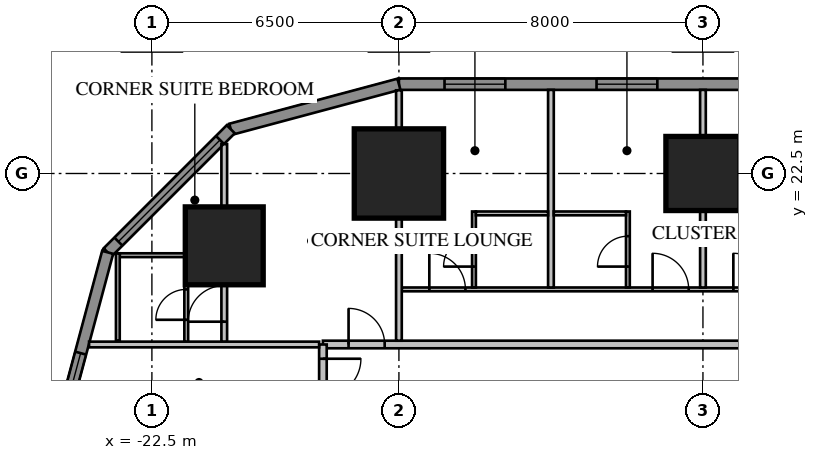
"""IFC4 building model, lengths in metres.
Left out: names, types, materials, properties, quantities, classifications, styles, units other than length and angle.
Written with IfcOpenShell. Run it as: python <this file> out.ifc"""

import sys

from ifc_helpers import new_model, si_unit, direction, frame, frame_2d, origin, origin_2d, place, context, subcontext, project, spatial, rectangle, extrude, element, fill, save


model = new_model("IFC4")
c1 = context("Model", 3, precision=1e-05, world=origin(), true_north=direction((0.0, 1.0)))
c2 = subcontext(c1, "Body", "Model", "MODEL_VIEW")
j1 = project(units=[si_unit("LENGTHUNIT", "METRE"), si_unit("PLANEANGLEUNIT", "RADIAN")], contexts=[c1])
p1 = place(None, origin())
s1 = spatial("IfcSite", under=j1, at=p1, CompositionType="ELEMENT")
p2 = place(p1, origin())
s2 = spatial("IfcBuilding", under=s1, at=p2, CompositionType="ELEMENT")
p3 = place(p2, frame((0.0, 0.0, 39.1)))
s3 = spatial("IfcBuildingStorey", under=s2, at=p3, CompositionType="ELEMENT", Elevation=39.1)
p4 = place(p3, frame((-8.0, 22.5, 0.0), z_axis=(0.0, 0.0, 1.0), x_axis=(1.0, 0.0, 0.0)))
e1 = element("IfcColumn", 1, at=p4, inside=s3, PredefinedType="COLUMN", context=c2, shape_type="SweptSolid", body=[
    extrude(rectangle(XDim=1.95, YDim=1.95, at=origin_2d()), origin(), (0.0, 0.0, 1.0), 3.85),
])
p5 = place(p3, frame((-16.0, 22.5, 0.0), z_axis=(0.0, 0.0, 1.0), x_axis=(1.0, 0.0, 0.0)))
e2 = element("IfcColumn", 2, at=p5, inside=s3, PredefinedType="COLUMN", context=c2, shape_type="SweptSolid", body=[
    extrude(rectangle(XDim=2.35, YDim=2.35, at=origin_2d()), origin(), (0.0, 0.0, 1.0), 3.85),
])
p6 = place(p3, frame((-20.596, 20.596, 0.0), z_axis=(0.0, 0.0, 1.0), x_axis=(1.0, 0.0, 0.0)))
e3 = element("IfcColumn", 3, at=p6, inside=s3, PredefinedType="COLUMN", context=c2, shape_type="SweptSolid", body=[
    extrude(rectangle(XDim=2.05, YDim=2.05, at=origin_2d()), origin(), (0.0, 0.0, 1.0), 3.85),
])
p7 = place(p3, frame((16.0, 24.85, 0.0), z_axis=(0.0, 0.0, 1.0), x_axis=(-1.0, 0.0, 0.0)))
e4 = element("IfcWall", 4, at=p7, inside=s3, PredefinedType="SOLIDWALL", context=c2, shape_type="SweptSolid", body=[
    extrude(rectangle(XDim=32.0, YDim=0.3, at=frame_2d((16.0, 0.0))), origin(), (0.0, 0.0, 1.0), 3.65),
])
p8 = place(p7, frame((1.2, 0.0, 0.75)))
e5 = element("IfcOpeningElement", 5, at=p8, cuts=e4, PredefinedType="OPENING", context=c2, shape_type="SweptSolid", body=[
    extrude(rectangle(XDim=1.6, YDim=1.8, at=frame_2d((0.8, 0.9))), frame((0.0, 0.17, 0.0), z_axis=(0.0, -1.0, 0.0), x_axis=(1.0, 0.0, 0.0)), (0.0, 0.0, 1.0), 0.34),
])
p9 = place(p7, frame((5.2, 0.0, 0.75)))
e6 = element("IfcOpeningElement", 6, at=p9, cuts=e4, PredefinedType="OPENING", context=c2, shape_type="SweptSolid", body=[
    extrude(rectangle(XDim=1.6, YDim=1.8, at=frame_2d((0.8, 0.9))), frame((0.0, 0.17, 0.0), z_axis=(0.0, -1.0, 0.0), x_axis=(1.0, 0.0, 0.0)), (0.0, 0.0, 1.0), 0.34),
])
p10 = place(p7, frame((17.2, 0.0, 0.75)))
e7 = element("IfcOpeningElement", 7, at=p10, cuts=e4, PredefinedType="OPENING", context=c2, shape_type="SweptSolid", body=[
    extrude(rectangle(XDim=1.6, YDim=1.8, at=frame_2d((0.8, 0.9))), frame((0.0, 0.17, 0.0), z_axis=(0.0, -1.0, 0.0), x_axis=(1.0, 0.0, 0.0)), (0.0, 0.0, 1.0), 0.34),
])
p11 = place(p7, frame((21.2, 0.0, 0.75)))
e8 = element("IfcOpeningElement", 8, at=p11, cuts=e4, PredefinedType="OPENING", context=c2, shape_type="SweptSolid", body=[
    extrude(rectangle(XDim=1.6, YDim=1.8, at=frame_2d((0.8, 0.9))), frame((0.0, 0.17, 0.0), z_axis=(0.0, -1.0, 0.0), x_axis=(1.0, 0.0, 0.0)), (0.0, 0.0, 1.0), 0.34),
])
p12 = place(p7, frame((25.2, 0.0, 0.75)))
e9 = element("IfcOpeningElement", 9, at=p12, cuts=e4, PredefinedType="OPENING", context=c2, shape_type="SweptSolid", body=[
    extrude(rectangle(XDim=1.6, YDim=1.8, at=frame_2d((0.8, 0.9))), frame((0.0, 0.17, 0.0), z_axis=(0.0, -1.0, 0.0), x_axis=(1.0, 0.0, 0.0)), (0.0, 0.0, 1.0), 0.34),
])
p13 = place(p7, frame((29.2, 0.0, 0.75)))
e10 = element("IfcOpeningElement", 10, at=p13, cuts=e4, PredefinedType="OPENING", context=c2, shape_type="SweptSolid", body=[
    extrude(rectangle(XDim=1.6, YDim=1.8, at=frame_2d((0.8, 0.9))), frame((0.0, 0.17, 0.0), z_axis=(0.0, -1.0, 0.0), x_axis=(1.0, 0.0, 0.0)), (0.0, 0.0, 1.0), 0.34),
])
p14 = place(p7, frame((8.8, 0.0, 0.75)))
e11 = element("IfcOpeningElement", 11, at=p14, cuts=e4, PredefinedType="OPENING", context=c2, shape_type="SweptSolid", body=[
    extrude(rectangle(XDim=2.4, YDim=1.8, at=frame_2d((1.2, 0.9))), frame((0.0, 0.17, 0.0), z_axis=(0.0, -1.0, 0.0), x_axis=(1.0, 0.0, 0.0)), (0.0, 0.0, 1.0), 0.34),
])
p15 = place(p7, frame((13.812, 0.0, 0.0)))
e12 = element("IfcOpeningElement", 12, at=p15, cuts=e4, PredefinedType="OPENING", context=c2, shape_type="SweptSolid", body=[
    extrude(rectangle(XDim=1.0, YDim=2.4, at=frame_2d((0.5, 1.2))), frame((0.0, 0.17, 0.0), z_axis=(0.0, -1.0, 0.0), x_axis=(1.0, 0.0, 0.0)), (0.0, 0.0, 1.0), 0.34),
])
p16 = place(p3, frame((-16.0, 24.85, 0.0), z_axis=(0.0, 0.0, 1.0), x_axis=(-0.965920218567, -0.258839972501, 0.0)))
e13 = element("IfcWall", 13, at=p16, inside=s3, PredefinedType="SOLIDWALL", context=c2, shape_type="SweptSolid", body=[
    extrude(rectangle(XDim=4.581, YDim=0.3, at=frame_2d((2.291, 0.0))), origin(), (0.0, 0.0, 1.0), 3.65),
])
p17 = place(p3, frame((-20.425, 23.664, 0.0), z_axis=(0.0, 0.0, 1.0), x_axis=(-0.707106781187, -0.707106781187, 0.0)))
e14 = element("IfcWall", 14, at=p17, inside=s3, PredefinedType="SOLIDWALL", context=c2, shape_type="SweptSolid", body=[
    extrude(rectangle(XDim=4.581, YDim=0.3, at=frame_2d((2.291, 0.0))), origin(), (0.0, 0.0, 1.0), 3.65),
])
p18 = place(p17, frame((0.4, 0.0, 0.75)))
e15 = element("IfcOpeningElement", 15, at=p18, cuts=e14, PredefinedType="OPENING", context=c2, shape_type="SweptSolid", body=[
    extrude(rectangle(XDim=3.781, YDim=1.8, at=frame_2d((1.891, 0.9))), frame((0.0, 0.17, 0.0), z_axis=(0.0, -1.0, 0.0), x_axis=(1.0, 0.0, 0.0)), (0.0, 0.0, 1.0), 0.34),
])
p19 = place(p3, frame((-23.664, 20.425, 0.0), z_axis=(0.0, 0.0, 1.0), x_axis=(-0.258839972501, -0.965920218567, 0.0)))
e16 = element("IfcWall", 16, at=p19, inside=s3, PredefinedType="SOLIDWALL", context=c2, shape_type="SweptSolid", body=[
    extrude(rectangle(XDim=4.581, YDim=0.3, at=frame_2d((2.291, 0.0))), origin(), (0.0, 0.0, 1.0), 3.65),
])
p20 = place(p19, frame((2.746, 0.0, 0.75)))
e17 = element("IfcOpeningElement", 17, at=p20, cuts=e16, PredefinedType="OPENING", context=c2, shape_type="SweptSolid", body=[
    extrude(rectangle(XDim=1.6, YDim=1.8, at=frame_2d((0.8, 0.9))), frame((0.0, 0.17, 0.0), z_axis=(0.0, -1.0, 0.0), x_axis=(1.0, 0.0, 0.0)), (0.0, 0.0, 1.0), 0.34),
])
p21 = place(p3, frame((18.0, 18.0, 0.0), z_axis=(0.0, 0.0, 1.0), x_axis=(-1.0, 0.0, 0.0)))
e18 = element("IfcWall", 18, at=p21, inside=s3, PredefinedType="PARTITIONING", context=c2, shape_type="SweptSolid", body=[
    extrude(rectangle(XDim=36.0, YDim=0.2, at=frame_2d((18.0, 0.0))), origin(), (0.0, 0.0, 1.0), 3.65),
])
p22 = place(p21, frame((10.4, 0.0, 0.0)))
e19 = element("IfcOpeningElement", 19, at=p22, cuts=e18, PredefinedType="OPENING", context=c2, shape_type="SweptSolid", body=[
    extrude(rectangle(XDim=1.0, YDim=2.1, at=frame_2d((0.5, 1.05))), frame((0.0, 0.12, 0.0), z_axis=(0.0, -1.0, 0.0), x_axis=(1.0, 0.0, 0.0)), (0.0, 0.0, 1.0), 0.24),
])
p23 = place(p21, frame((0.375, 0.0, 0.0)))
e20 = element("IfcOpeningElement", 20, at=p23, cuts=e18, PredefinedType="OPENING", context=c2, shape_type="SweptSolid", body=[
    extrude(rectangle(XDim=1.0, YDim=2.1, at=frame_2d((0.5, 1.05))), frame((0.0, 0.12, 0.0), z_axis=(0.0, -1.0, 0.0), x_axis=(1.0, 0.0, 0.0)), (0.0, 0.0, 1.0), 0.24),
])
p24 = place(p21, frame((34.375, 0.0, 0.0)))
e21 = element("IfcOpeningElement", 21, at=p24, cuts=e18, PredefinedType="OPENING", context=c2, shape_type="SweptSolid", body=[
    extrude(rectangle(XDim=0.95, YDim=2.1, at=frame_2d((0.475, 1.05))), frame((0.0, 0.12, 0.0), z_axis=(0.0, -1.0, 0.0), x_axis=(1.0, 0.0, 0.0)), (0.0, 0.0, 1.0), 0.24),
])
p25 = place(p3, frame((15.925, 19.45, 0.0), z_axis=(0.0, 0.0, 1.0), x_axis=(-1.0, 0.0, 0.0)))
e22 = element("IfcWall", 22, at=p25, inside=s3, PredefinedType="PARTITIONING", context=c2, shape_type="SweptSolid", body=[
    extrude(rectangle(XDim=31.85, YDim=0.1, at=frame_2d((15.925, 0.0))), origin(), (0.0, 0.0, 1.0), 3.65),
])
p26 = place(p25, frame((10.125, 0.0, 0.0)))
e23 = element("IfcOpeningElement", 23, at=p26, cuts=e22, PredefinedType="OPENING", context=c2, shape_type="SweptSolid", body=[
    extrude(rectangle(XDim=1.0, YDim=2.1, at=frame_2d((0.5, 1.05))), frame((0.0, 0.07, 0.0), z_axis=(0.0, -1.0, 0.0), x_axis=(1.0, 0.0, 0.0)), (0.0, 0.0, 1.0), 0.14),
])
p27 = place(p25, frame((8.3, 0.0, 0.0)))
e24 = element("IfcOpeningElement", 24, at=p27, cuts=e22, PredefinedType="OPENING", context=c2, shape_type="SweptSolid", body=[
    extrude(rectangle(XDim=0.8, YDim=2.1, at=frame_2d((0.4, 1.05))), frame((0.0, 0.07, 0.0), z_axis=(0.0, -1.0, 0.0), x_axis=(1.0, 0.0, 0.0)), (0.0, 0.0, 1.0), 0.14),
])
p28 = place(p25, frame((0.3, 0.0, 0.0)))
e25 = element("IfcOpeningElement", 25, at=p28, cuts=e22, PredefinedType="OPENING", context=c2, shape_type="SweptSolid", body=[
    extrude(rectangle(XDim=0.95, YDim=2.1, at=frame_2d((0.475, 1.05))), frame((0.0, 0.07, 0.0), z_axis=(0.0, -1.0, 0.0), x_axis=(1.0, 0.0, 0.0)), (0.0, 0.0, 1.0), 0.14),
])
p29 = place(p25, frame((6.175, 0.0, 0.0)))
e26 = element("IfcOpeningElement", 26, at=p29, cuts=e22, PredefinedType="OPENING", context=c2, shape_type="SweptSolid", body=[
    extrude(rectangle(XDim=0.95, YDim=2.1, at=frame_2d((0.475, 1.05))), frame((0.0, 0.07, 0.0), z_axis=(0.0, -1.0, 0.0), x_axis=(1.0, 0.0, 0.0)), (0.0, 0.0, 1.0), 0.14),
])
p30 = place(p25, frame((16.3, 0.0, 0.0)))
e27 = element("IfcOpeningElement", 27, at=p30, cuts=e22, PredefinedType="OPENING", context=c2, shape_type="SweptSolid", body=[
    extrude(rectangle(XDim=0.95, YDim=2.1, at=frame_2d((0.475, 1.05))), frame((0.0, 0.07, 0.0), z_axis=(0.0, -1.0, 0.0), x_axis=(1.0, 0.0, 0.0)), (0.0, 0.0, 1.0), 0.14),
])
p31 = place(p25, frame((22.175, 0.0, 0.0)))
e28 = element("IfcOpeningElement", 28, at=p31, cuts=e22, PredefinedType="OPENING", context=c2, shape_type="SweptSolid", body=[
    extrude(rectangle(XDim=0.95, YDim=2.1, at=frame_2d((0.475, 1.05))), frame((0.0, 0.07, 0.0), z_axis=(0.0, -1.0, 0.0), x_axis=(1.0, 0.0, 0.0)), (0.0, 0.0, 1.0), 0.14),
])
p32 = place(p25, frame((24.3, 0.0, 0.0)))
e29 = element("IfcOpeningElement", 29, at=p32, cuts=e22, PredefinedType="OPENING", context=c2, shape_type="SweptSolid", body=[
    extrude(rectangle(XDim=0.95, YDim=2.1, at=frame_2d((0.475, 1.05))), frame((0.0, 0.07, 0.0), z_axis=(0.0, -1.0, 0.0), x_axis=(1.0, 0.0, 0.0)), (0.0, 0.0, 1.0), 0.14),
])
p33 = place(p25, frame((30.175, 0.0, 0.0)))
e30 = element("IfcOpeningElement", 30, at=p33, cuts=e22, PredefinedType="OPENING", context=c2, shape_type="SweptSolid", body=[
    extrude(rectangle(XDim=0.95, YDim=2.1, at=frame_2d((0.475, 1.05))), frame((0.0, 0.07, 0.0), z_axis=(0.0, -1.0, 0.0), x_axis=(1.0, 0.0, 0.0)), (0.0, 0.0, 1.0), 0.14),
])
for number, where, z_axis, x_axis in (
    (31, (-8.0, 19.5, 0.0), (0.0, 0.0, 1.0), (0.0, 1.0, 0.0)),
    (32, (-12.0, 19.5, 0.0), (0.0, 0.0, 1.0), (0.0, 1.0, 0.0)),
):
    element("IfcWall", number, at=place(p3, frame(where, z_axis=z_axis, x_axis=x_axis)), inside=s3, PredefinedType="PARTITIONING", context=c2, shape_type="SweptSolid", body=[
        extrude(rectangle(XDim=5.2, YDim=0.15, at=frame_2d((2.6, 0.0))), origin(), (0.0, 0.0, 1.0), 3.65),
    ])
p34 = place(p3, frame((-16.0, 18.1, 0.0), z_axis=(0.0, 0.0, 1.0), x_axis=(0.0, 1.0, 0.0)))
e33 = element("IfcWall", 33, at=p34, inside=s3, PredefinedType="PARTITIONING", context=c2, shape_type="SweptSolid", body=[
    extrude(rectangle(XDim=6.589, YDim=0.15, at=frame_2d((3.295, 0.0))), origin(), (0.0, 0.0, 1.0), 3.65),
])
p35 = place(p3, frame((-9.975, 19.5, 0.0), z_axis=(0.0, 0.0, 1.0), x_axis=(0.0, 1.0, 0.0)))
e34 = element("IfcWall", 34, at=p35, inside=s3, PredefinedType="PARTITIONING", context=c2, shape_type="SweptSolid", body=[
    extrude(rectangle(XDim=2.0, YDim=0.1, at=frame_2d((1.0, 0.0))), origin(), (0.0, 0.0, 1.0), 3.65),
])
p36 = place(p35, frame((0.55, 0.0, 0.0)))
e35 = element("IfcOpeningElement", 35, at=p36, cuts=e34, PredefinedType="OPENING", context=c2, shape_type="SweptSolid", body=[
    extrude(rectangle(XDim=0.8, YDim=2.1, at=frame_2d((0.4, 1.05))), frame((0.0, 0.07, 0.0), z_axis=(0.0, -1.0, 0.0), x_axis=(1.0, 0.0, 0.0)), (0.0, 0.0, 1.0), 0.14),
])
p37 = place(p3, frame((-10.025, 21.45, 0.0), z_axis=(0.0, 0.0, 1.0), x_axis=(-1.0, 0.0, 0.0)))
e36 = element("IfcWall", 36, at=p37, inside=s3, PredefinedType="PARTITIONING", context=c2, shape_type="SweptSolid", body=[
    extrude(rectangle(XDim=1.9, YDim=0.1, at=frame_2d((0.95, 0.0))), origin(), (0.0, 0.0, 1.0), 3.65),
])
p38 = place(p3, frame((-14.025, 19.5, 0.0), z_axis=(0.0, 0.0, 1.0), x_axis=(0.0, 1.0, 0.0)))
e37 = element("IfcWall", 37, at=p38, inside=s3, PredefinedType="PARTITIONING", context=c2, shape_type="SweptSolid", body=[
    extrude(rectangle(XDim=2.0, YDim=0.1, at=frame_2d((1.0, 0.0))), origin(), (0.0, 0.0, 1.0), 3.65),
])
p39 = place(p38, frame((0.55, 0.0, 0.0)))
e38 = element("IfcOpeningElement", 38, at=p39, cuts=e37, PredefinedType="OPENING", context=c2, shape_type="SweptSolid", body=[
    extrude(rectangle(XDim=0.8, YDim=2.1, at=frame_2d((0.4, 1.05))), frame((0.0, 0.07, 0.0), z_axis=(0.0, -1.0, 0.0), x_axis=(1.0, 0.0, 0.0)), (0.0, 0.0, 1.0), 0.14),
])
p40 = place(p3, frame((-12.075, 21.45, 0.0), z_axis=(0.0, 0.0, 1.0), x_axis=(-1.0, 0.0, 0.0)))
e39 = element("IfcWall", 39, at=p40, inside=s3, PredefinedType="PARTITIONING", context=c2, shape_type="SweptSolid", body=[
    extrude(rectangle(XDim=1.9, YDim=0.1, at=frame_2d((0.95, 0.0))), origin(), (0.0, 0.0, 1.0), 3.65),
])
p41 = place(p3, frame((-21.596, 18.065, 0.0), z_axis=(0.0, 0.0, 1.0), x_axis=(0.0, 1.0, 0.0)))
e40 = element("IfcWall", 40, at=p41, inside=s3, PredefinedType="PARTITIONING", context=c2, shape_type="SweptSolid", body=[
    extrude(rectangle(XDim=2.335, YDim=0.1, at=frame_2d((1.167, 0.0))), origin(), (0.0, 0.0, 1.0), 3.65),
])
p42 = place(p41, frame((0.585, 0.0, 0.0)))
e41 = element("IfcOpeningElement", 41, at=p42, cuts=e40, PredefinedType="OPENING", context=c2, shape_type="SweptSolid", body=[
    extrude(rectangle(XDim=0.8, YDim=2.1, at=frame_2d((0.4, 1.05))), frame((0.0, 0.07, 0.0), z_axis=(0.0, -1.0, 0.0), x_axis=(1.0, 0.0, 0.0)), (0.0, 0.0, 1.0), 0.14),
])
p43 = place(p3, frame((-21.646, 20.35, 0.0), z_axis=(0.0, 0.0, 1.0), x_axis=(-1.0, 0.0, 0.0)))
e42 = element("IfcWall", 42, at=p43, inside=s3, PredefinedType="PARTITIONING", context=c2, shape_type="SweptSolid", body=[
    extrude(rectangle(XDim=1.7, YDim=0.1, at=frame_2d((0.85, 0.0))), origin(), (0.0, 0.0, 1.0), 3.65),
])
p44 = place(p3, frame((-23.396, 18.1, 0.0), z_axis=(0.0, 0.0, 1.0), x_axis=(0.0, 1.0, 0.0)))
e43 = element("IfcWall", 43, at=p44, inside=s3, PredefinedType="PARTITIONING", context=c2, shape_type="SweptSolid", body=[
    extrude(rectangle(XDim=2.3, YDim=0.1, at=frame_2d((1.15, 0.0))), origin(), (0.0, 0.0, 1.0), 3.65),
])
p45 = place(p3, frame((-20.596, 18.065, 0.0), z_axis=(0.0, 0.0, 1.0), x_axis=(0.0, 1.0, 0.0)))
e44 = element("IfcWall", 44, at=p45, inside=s3, PredefinedType="PARTITIONING", context=c2, shape_type="SweptSolid", body=[
    extrude(rectangle(XDim=5.209, YDim=0.15, at=frame_2d((2.604, 0.0))), origin(), (0.0, 0.0, 1.0), 3.65),
])
p46 = place(p45, frame((0.535, 0.0, 0.0)))
e45 = element("IfcOpeningElement", 45, at=p46, cuts=e44, PredefinedType="OPENING", context=c2, shape_type="SweptSolid", body=[
    extrude(rectangle(XDim=0.95, YDim=2.1, at=frame_2d((0.475, 1.05))), frame((0.0, 0.095, 0.0), z_axis=(0.0, -1.0, 0.0), x_axis=(1.0, 0.0, 0.0)), (0.0, 0.0, 1.0), 0.19),
])
p47 = place(p3, frame((-18.0, 18.0, 0.0), z_axis=(0.0, 0.0, 1.0), x_axis=(0.0, -1.0, 0.0)))
e46 = element("IfcWall", 46, at=p47, inside=s3, PredefinedType="PARTITIONING", context=c2, shape_type="SweptSolid", body=[
    extrude(rectangle(XDim=36.0, YDim=0.2, at=frame_2d((18.0, 0.0))), origin(), (0.0, 0.0, 1.0), 3.65),
])
p48 = place(p47, frame((10.4, 0.0, 0.0)))
e47 = element("IfcOpeningElement", 47, at=p48, cuts=e46, PredefinedType="OPENING", context=c2, shape_type="SweptSolid", body=[
    extrude(rectangle(XDim=1.0, YDim=2.1, at=frame_2d((0.5, 1.05))), frame((0.0, 0.12, 0.0), z_axis=(0.0, -1.0, 0.0), x_axis=(1.0, 0.0, 0.0)), (0.0, 0.0, 1.0), 0.24),
])
p49 = place(p47, frame((0.375, 0.0, 0.0)))
e48 = element("IfcOpeningElement", 48, at=p49, cuts=e46, PredefinedType="OPENING", context=c2, shape_type="SweptSolid", body=[
    extrude(rectangle(XDim=1.0, YDim=2.1, at=frame_2d((0.5, 1.05))), frame((0.0, 0.12, 0.0), z_axis=(0.0, -1.0, 0.0), x_axis=(1.0, 0.0, 0.0)), (0.0, 0.0, 1.0), 0.24),
])
p50 = place(p47, frame((34.375, 0.0, 0.0)))
e49 = element("IfcOpeningElement", 49, at=p50, cuts=e46, PredefinedType="OPENING", context=c2, shape_type="SweptSolid", body=[
    extrude(rectangle(XDim=0.95, YDim=2.1, at=frame_2d((0.475, 1.05))), frame((0.0, 0.12, 0.0), z_axis=(0.0, -1.0, 0.0), x_axis=(1.0, 0.0, 0.0)), (0.0, 0.0, 1.0), 0.24),
])
p51 = place(p3, frame((-18.1, 18.0, 0.0), z_axis=(0.0, 0.0, 1.0), x_axis=(-1.0, 0.0, 0.0)))
e50 = element("IfcWall", 50, at=p51, inside=s3, PredefinedType="PARTITIONING", context=c2, shape_type="SweptSolid", body=[
    extrude(rectangle(XDim=6.053, YDim=0.15, at=frame_2d((3.027, 0.0))), origin(), (0.0, 0.0, 1.0), 3.65),
])
p52 = place(p12, origin())
e51 = element("IfcWindow", 51, at=p52, inside=s3, PartitioningType="SINGLE_PANEL", PredefinedType="WINDOW", context=c2, shape_type="SweptSolid", body=[
    extrude(rectangle(XDim=1.6, YDim=1.8, at=frame_2d((0.8, 0.9))), frame((0.0, 0.03, 0.0), z_axis=(0.0, -1.0, 0.0), x_axis=(1.0, 0.0, 0.0)), (0.0, 0.0, 1.0), 0.06),
])
fill(e9, e51)
p53 = place(p13, origin())
e52 = element("IfcWindow", 52, at=p53, inside=s3, PartitioningType="SINGLE_PANEL", PredefinedType="WINDOW", context=c2, shape_type="SweptSolid", body=[
    extrude(rectangle(XDim=1.6, YDim=1.8, at=frame_2d((0.8, 0.9))), frame((0.0, 0.03, 0.0), z_axis=(0.0, -1.0, 0.0), x_axis=(1.0, 0.0, 0.0)), (0.0, 0.0, 1.0), 0.06),
])
fill(e10, e52)
p54 = place(p18, origin())
e53 = element("IfcWindow", 53, at=p54, inside=s3, PartitioningType="SINGLE_PANEL", PredefinedType="WINDOW", context=c2, shape_type="SweptSolid", body=[
    extrude(rectangle(XDim=3.781, YDim=1.8, at=frame_2d((1.891, 0.9))), frame((0.0, 0.03, 0.0), z_axis=(0.0, -1.0, 0.0), x_axis=(1.0, 0.0, 0.0)), (0.0, 0.0, 1.0), 0.06),
])
fill(e15, e53)
p55 = place(p20, origin())
e54 = element("IfcWindow", 54, at=p55, inside=s3, PartitioningType="SINGLE_PANEL", PredefinedType="WINDOW", context=c2, shape_type="SweptSolid", body=[
    extrude(rectangle(XDim=1.6, YDim=1.8, at=frame_2d((0.8, 0.9))), frame((0.0, 0.03, 0.0), z_axis=(0.0, -1.0, 0.0), x_axis=(1.0, 0.0, 0.0)), (0.0, 0.0, 1.0), 0.06),
])
fill(e17, e54)
p56 = place(p31, origin())
e55 = element("IfcDoor", 55, at=p56, inside=s3, OperationType="SINGLE_SWING_RIGHT", PredefinedType="DOOR", context=c2, shape_type="SweptSolid", body=[
    extrude(rectangle(XDim=0.95, YDim=2.1, at=frame_2d((0.475, 1.05))), frame((0.0, 0.025, 0.0), z_axis=(0.0, -1.0, 0.0), x_axis=(1.0, 0.0, 0.0)), (0.0, 0.0, 1.0), 0.05),
])
fill(e28, e55)
p57 = place(p32, origin())
e56 = element("IfcDoor", 56, at=p57, inside=s3, OperationType="SINGLE_SWING_RIGHT", PredefinedType="DOOR", context=c2, shape_type="SweptSolid", body=[
    extrude(rectangle(XDim=0.95, YDim=2.1, at=frame_2d((0.475, 1.05))), frame((0.0, 0.025, 0.0), z_axis=(0.0, -1.0, 0.0), x_axis=(1.0, 0.0, 0.0)), (0.0, 0.0, 1.0), 0.05),
])
fill(e29, e56)
p58 = place(p36, origin())
e57 = element("IfcDoor", 57, at=p58, inside=s3, OperationType="SINGLE_SWING_LEFT", PredefinedType="DOOR", context=c2, shape_type="SweptSolid", body=[
    extrude(rectangle(XDim=0.8, YDim=2.1, at=frame_2d((0.4, 1.05))), frame((0.0, 0.025, 0.0), z_axis=(0.0, -1.0, 0.0), x_axis=(1.0, 0.0, 0.0)), (0.0, 0.0, 1.0), 0.05),
])
fill(e35, e57)
p59 = place(p33, origin())
e58 = element("IfcDoor", 58, at=p59, inside=s3, OperationType="SINGLE_SWING_RIGHT", PredefinedType="DOOR", context=c2, shape_type="SweptSolid", body=[
    extrude(rectangle(XDim=0.95, YDim=2.1, at=frame_2d((0.475, 1.05))), frame((0.0, 0.025, 0.0), z_axis=(0.0, -1.0, 0.0), x_axis=(1.0, 0.0, 0.0)), (0.0, 0.0, 1.0), 0.05),
])
fill(e30, e58)
p60 = place(p39, origin())
e59 = element("IfcDoor", 59, at=p60, inside=s3, OperationType="SINGLE_SWING_LEFT", PredefinedType="DOOR", context=c2, shape_type="SweptSolid", body=[
    extrude(rectangle(XDim=0.8, YDim=2.1, at=frame_2d((0.4, 1.05))), frame((0.0, 0.025, 0.0), z_axis=(0.0, -1.0, 0.0), x_axis=(1.0, 0.0, 0.0)), (0.0, 0.0, 1.0), 0.05),
])
fill(e38, e59)
p61 = place(p24, origin())
e60 = element("IfcDoor", 60, at=p61, inside=s3, OperationType="SINGLE_SWING_RIGHT", PredefinedType="DOOR", context=c2, shape_type="SweptSolid", body=[
    extrude(rectangle(XDim=0.95, YDim=2.1, at=frame_2d((0.475, 1.05))), frame((0.0, 0.025, 0.0), z_axis=(0.0, -1.0, 0.0), x_axis=(1.0, 0.0, 0.0)), (0.0, 0.0, 1.0), 0.05),
])
fill(e21, e60)
p62 = place(p42, origin())
e61 = element("IfcDoor", 61, at=p62, inside=s3, OperationType="SINGLE_SWING_LEFT", PredefinedType="DOOR", context=c2, shape_type="SweptSolid", body=[
    extrude(rectangle(XDim=0.8, YDim=2.1, at=frame_2d((0.4, 1.05))), frame((0.0, 0.025, 0.0), z_axis=(0.0, -1.0, 0.0), x_axis=(1.0, 0.0, 0.0)), (0.0, 0.0, 1.0), 0.05),
])
fill(e41, e61)
p63 = place(p46, origin())
e62 = element("IfcDoor", 62, at=p63, inside=s3, OperationType="SINGLE_SWING_LEFT", PredefinedType="DOOR", context=c2, shape_type="SweptSolid", body=[
    extrude(rectangle(XDim=0.95, YDim=2.1, at=frame_2d((0.475, 1.05))), frame((0.0, 0.025, 0.0), z_axis=(0.0, -1.0, 0.0), x_axis=(1.0, 0.0, 0.0)), (0.0, 0.0, 1.0), 0.05),
])
fill(e45, e62)
p64 = place(p49, origin())
e63 = element("IfcDoor", 63, at=p64, inside=s3, OperationType="SINGLE_SWING_LEFT", PredefinedType="DOOR", context=c2, shape_type="SweptSolid", body=[
    extrude(rectangle(XDim=1.0, YDim=2.1, at=frame_2d((0.5, 1.05))), frame((0.0, 0.025, 0.0), z_axis=(0.0, -1.0, 0.0), x_axis=(1.0, 0.0, 0.0)), (0.0, 0.0, 1.0), 0.05),
])
fill(e48, e63)
save(model, sys.argv[1])
